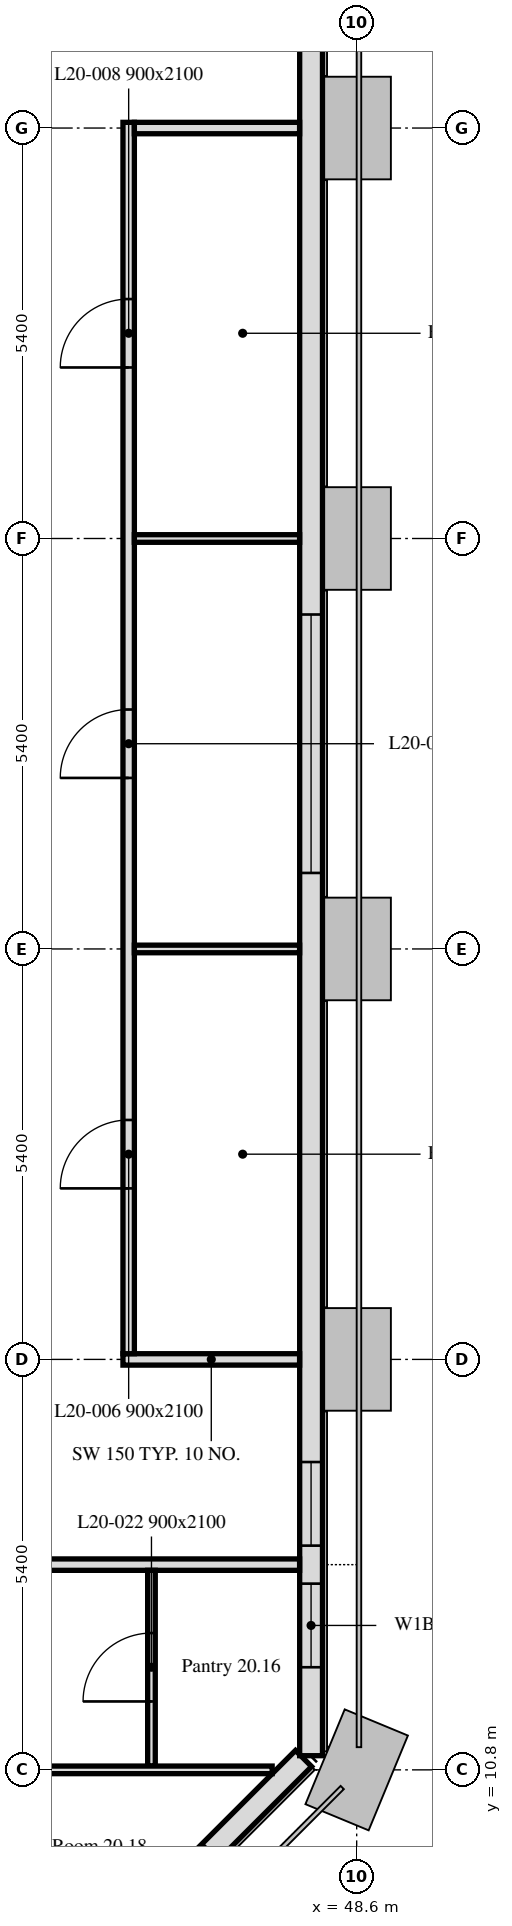
"""IFC4 building model, lengths in metres.
Left out: names, types, materials, properties, quantities, classifications, styles, units other than length and angle.
Written with IfcOpenShell. Run it as: python <this file> out.ifc"""

import sys

from ifc_helpers import new_model, si_unit, direction, frame, frame_2d, origin, place, context, subcontext, project, spatial, rectangle, extrude, element, fill, save


model = new_model("IFC4")
c1 = context("Model", 3, precision=1e-05, world=origin(), true_north=direction((0.0, 1.0)))
c2 = subcontext(c1, "Body", "Model", "MODEL_VIEW")
j1 = project(units=[si_unit("LENGTHUNIT", "METRE"), si_unit("PLANEANGLEUNIT", "RADIAN")], contexts=[c1])
p1 = place(None, origin())
s1 = spatial("IfcSite", under=j1, at=p1, CompositionType="ELEMENT")
p2 = place(p1, origin())
s2 = spatial("IfcBuilding", under=s1, at=p2, CompositionType="ELEMENT")
p3 = place(p2, frame((0.0, 0.0, 87.8)))
s3 = spatial("IfcBuildingStorey", under=s2, at=p3, CompositionType="ELEMENT", Elevation=87.8)
p4 = place(p3, frame((43.051, 6.099, 0.0), z_axis=(0.0, 0.0, 1.0), x_axis=(0.707106781187, 0.707106781187, 0.0)))
e1 = element("IfcWall", 1, at=p4, inside=s3, PredefinedType="SOLIDWALL", context=c2, shape_type="SweptSolid", body=[
    extrude(rectangle(XDim=6.86, YDim=0.3, at=frame_2d((3.43, 0.0))), origin(), (0.0, 0.0, 1.0), 3.5),
])
p5 = place(p4, frame((1.73, 0.0, 0.9)))
e2 = element("IfcOpeningElement", 2, at=p5, cuts=e1, PredefinedType="OPENING", context=c2, shape_type="SweptSolid", body=[
    extrude(rectangle(XDim=3.4, YDim=1.7, at=frame_2d((1.7, 0.85))), frame((0.0, 0.16, 0.0), z_axis=(0.0, -1.0, 0.0), x_axis=(1.0, 0.0, 0.0)), (0.0, 0.0, 1.0), 0.32),
])
p6 = place(p3, frame((48.0, 10.986, 0.0), z_axis=(0.0, 0.0, 1.0), x_axis=(0.0, 1.0, 0.0)))
e3 = element("IfcWall", 3, at=p6, inside=s3, PredefinedType="SOLIDWALL", context=c2, shape_type="SweptSolid", body=[
    extrude(rectangle(XDim=32.027, YDim=0.3, at=frame_2d((16.014, 0.0))), origin(), (0.0, 0.0, 1.0), 3.5),
])
p7 = place(p6, frame((1.164, 0.0, 0.9)))
e4 = element("IfcOpeningElement", 4, at=p7, cuts=e3, PredefinedType="OPENING", context=c2, shape_type="SweptSolid", body=[
    extrude(rectangle(XDim=1.1, YDim=1.7, at=frame_2d((0.55, 0.85))), frame((0.0, 0.16, 0.0), z_axis=(0.0, -1.0, 0.0), x_axis=(1.0, 0.0, 0.0)), (0.0, 0.0, 1.0), 0.32),
])
p8 = place(p6, frame((2.764, 0.0, 0.9)))
e5 = element("IfcOpeningElement", 5, at=p8, cuts=e3, PredefinedType="OPENING", context=c2, shape_type="SweptSolid", body=[
    extrude(rectangle(XDim=1.1, YDim=1.7, at=frame_2d((0.55, 0.85))), frame((0.0, 0.16, 0.0), z_axis=(0.0, -1.0, 0.0), x_axis=(1.0, 0.0, 0.0)), (0.0, 0.0, 1.0), 0.32),
])
p9 = place(p6, frame((11.614, 0.0, 0.9)))
e6 = element("IfcOpeningElement", 6, at=p9, cuts=e3, PredefinedType="OPENING", context=c2, shape_type="SweptSolid", body=[
    extrude(rectangle(XDim=3.4, YDim=1.7, at=frame_2d((1.7, 0.85))), frame((0.0, 0.16, 0.0), z_axis=(0.0, -1.0, 0.0), x_axis=(1.0, 0.0, 0.0)), (0.0, 0.0, 1.0), 0.32),
])
p10 = place(p6, frame((22.764, 0.0, 0.9)))
e7 = element("IfcOpeningElement", 7, at=p10, cuts=e3, PredefinedType="OPENING", context=c2, shape_type="SweptSolid", body=[
    extrude(rectangle(XDim=1.1, YDim=1.7, at=frame_2d((0.55, 0.85))), frame((0.0, 0.16, 0.0), z_axis=(0.0, -1.0, 0.0), x_axis=(1.0, 0.0, 0.0)), (0.0, 0.0, 1.0), 0.32),
])
p11 = place(p6, frame((24.364, 0.0, 0.9)))
e8 = element("IfcOpeningElement", 8, at=p11, cuts=e3, PredefinedType="OPENING", context=c2, shape_type="SweptSolid", body=[
    extrude(rectangle(XDim=1.1, YDim=1.7, at=frame_2d((0.55, 0.85))), frame((0.0, 0.16, 0.0), z_axis=(0.0, -1.0, 0.0), x_axis=(1.0, 0.0, 0.0)), (0.0, 0.0, 1.0), 0.32),
])
p12 = place(p3, frame((47.849, 16.2, 0.0), z_axis=(0.0, 0.0, 1.0), x_axis=(-1.0, 0.0, 0.0)))
e9 = element("IfcWall", 9, at=p12, inside=s3, PredefinedType="PARTITIONING", context=c2, shape_type="SweptSolid", body=[
    extrude(rectangle(XDim=2.324, YDim=0.15, at=frame_2d((1.162, 0.0))), origin(), (0.0, 0.0, 1.0), 2.75),
])
p13 = place(p3, frame((45.6, 16.275, 0.0), z_axis=(0.0, 0.0, 1.0), x_axis=(0.0, 1.0, 0.0)))
e10 = element("IfcWall", 10, at=p13, inside=s3, PredefinedType="PARTITIONING", context=c2, shape_type="SweptSolid", body=[
    extrude(rectangle(XDim=16.2, YDim=0.15, at=frame_2d((8.1, 0.0))), origin(), (0.0, 0.0, 1.0), 2.75),
])
p14 = place(p13, frame((2.175, 0.0, 0.0)))
e11 = element("IfcOpeningElement", 11, at=p14, cuts=e10, PredefinedType="OPENING", context=c2, shape_type="SweptSolid", body=[
    extrude(rectangle(XDim=0.9, YDim=2.1, at=frame_2d((0.45, 1.05))), frame((0.0, 0.075, 0.0), z_axis=(0.0, -1.0, 0.0), x_axis=(1.0, 0.0, 0.0)), (0.0, 0.0, 1.0), 0.15),
])
p15 = place(p13, frame((7.575, 0.0, 0.0)))
e12 = element("IfcOpeningElement", 12, at=p15, cuts=e10, PredefinedType="OPENING", context=c2, shape_type="SweptSolid", body=[
    extrude(rectangle(XDim=0.9, YDim=2.1, at=frame_2d((0.45, 1.05))), frame((0.0, 0.075, 0.0), z_axis=(0.0, -1.0, 0.0), x_axis=(1.0, 0.0, 0.0)), (0.0, 0.0, 1.0), 0.15),
])
p16 = place(p13, frame((12.975, 0.0, 0.0)))
e13 = element("IfcOpeningElement", 13, at=p16, cuts=e10, PredefinedType="OPENING", context=c2, shape_type="SweptSolid", body=[
    extrude(rectangle(XDim=0.9, YDim=2.1, at=frame_2d((0.45, 1.05))), frame((0.0, 0.075, 0.0), z_axis=(0.0, -1.0, 0.0), x_axis=(1.0, 0.0, 0.0)), (0.0, 0.0, 1.0), 0.15),
])
p17 = place(p3, frame((45.675, 32.4, 0.0), z_axis=(0.0, 0.0, 1.0), x_axis=(1.0, 0.0, 0.0)))
e14 = element("IfcWall", 14, at=p17, inside=s3, PredefinedType="PARTITIONING", context=c2, shape_type="SweptSolid", body=[
    extrude(rectangle(XDim=2.174, YDim=0.15, at=frame_2d((1.087, 0.0))), origin(), (0.0, 0.0, 1.0), 2.75),
])
p18 = place(p3, frame((6.151, 13.5, 0.0), z_axis=(0.0, 0.0, 1.0), x_axis=(1.0, 0.0, 0.0)))
e15 = element("IfcWall", 15, at=p18, inside=s3, PredefinedType="PARTITIONING", context=c2, shape_type="SweptSolid", body=[
    extrude(rectangle(XDim=41.698, YDim=0.15, at=frame_2d((20.849, 0.0))), origin(), (0.0, 0.0, 1.0), 3.5),
])
p19 = place(p18, frame((0.879, 0.0, 0.0)))
e16 = element("IfcOpeningElement", 16, at=p19, cuts=e15, PredefinedType="OPENING", context=c2, shape_type="SweptSolid", body=[
    extrude(rectangle(XDim=0.9, YDim=2.1, at=frame_2d((0.45, 1.05))), frame((0.0, 0.075, 0.0), z_axis=(0.0, -1.0, 0.0), x_axis=(1.0, 0.0, 0.0)), (0.0, 0.0, 1.0), 0.15),
])
p20 = place(p18, frame((17.079, 0.0, 0.0)))
e17 = element("IfcOpeningElement", 17, at=p20, cuts=e15, PredefinedType="OPENING", context=c2, shape_type="SweptSolid", body=[
    extrude(rectangle(XDim=0.9, YDim=2.1, at=frame_2d((0.45, 1.05))), frame((0.0, 0.075, 0.0), z_axis=(0.0, -1.0, 0.0), x_axis=(1.0, 0.0, 0.0)), (0.0, 0.0, 1.0), 0.15),
])
p21 = place(p18, frame((33.279, 0.0, 0.0)))
e18 = element("IfcOpeningElement", 18, at=p21, cuts=e15, PredefinedType="OPENING", context=c2, shape_type="SweptSolid", body=[
    extrude(rectangle(XDim=0.9, YDim=2.1, at=frame_2d((0.45, 1.05))), frame((0.0, 0.075, 0.0), z_axis=(0.0, -1.0, 0.0), x_axis=(1.0, 0.0, 0.0)), (0.0, 0.0, 1.0), 0.15),
])
p22 = place(p18, frame((11.679, 0.0, 0.0)))
e19 = element("IfcOpeningElement", 19, at=p22, cuts=e15, PredefinedType="OPENING", context=c2, shape_type="SweptSolid", body=[
    extrude(rectangle(XDim=0.9, YDim=2.1, at=frame_2d((0.45, 1.05))), frame((0.0, 0.075, 0.0), z_axis=(0.0, -1.0, 0.0), x_axis=(1.0, 0.0, 0.0)), (0.0, 0.0, 1.0), 0.15),
])
p23 = place(p18, frame((34.519, 0.0, 0.0)))
e20 = element("IfcOpeningElement", 20, at=p23, cuts=e15, PredefinedType="OPENING", context=c2, shape_type="SweptSolid", body=[
    extrude(rectangle(XDim=0.9, YDim=2.1, at=frame_2d((0.45, 1.05))), frame((0.0, 0.075, 0.0), z_axis=(0.0, -1.0, 0.0), x_axis=(1.0, 0.0, 0.0)), (0.0, 0.0, 1.0), 0.15),
])
p24 = place(p3, frame((45.9, 10.85, 0.0), z_axis=(0.0, 0.0, 1.0), x_axis=(0.0, 1.0, 0.0)))
e21 = element("IfcWall", 21, at=p24, inside=s3, PredefinedType="PARTITIONING", context=c2, shape_type="SweptSolid", body=[
    extrude(rectangle(XDim=2.575, YDim=0.1, at=frame_2d((1.288, 0.0))), origin(), (0.0, 0.0, 1.0), 3.5),
])
p25 = place(p24, frame((0.85, 0.0, 0.0)))
e22 = element("IfcOpeningElement", 22, at=p25, cuts=e21, PredefinedType="OPENING", context=c2, shape_type="SweptSolid", body=[
    extrude(rectangle(XDim=0.9, YDim=2.1, at=frame_2d((0.45, 1.05))), frame((0.0, 0.05, 0.0), z_axis=(0.0, -1.0, 0.0), x_axis=(1.0, 0.0, 0.0)), (0.0, 0.0, 1.0), 0.1),
])
p26 = place(p3, frame((43.72, 10.8, 0.0), z_axis=(0.0, 0.0, 1.0), x_axis=(1.0, 0.0, 0.0)))
e23 = element("IfcWall", 23, at=p26, inside=s3, PredefinedType="PARTITIONING", context=c2, shape_type="SweptSolid", body=[
    extrude(rectangle(XDim=3.768, YDim=0.1, at=frame_2d((1.884, 0.0))), origin(), (0.0, 0.0, 1.0), 3.5),
])
for number, where, z_axis, x_axis in (
    (24, (47.849, 21.6, 0.0), (0.0, 0.0, 1.0), (-1.0, 0.0, 0.0)),
    (25, (47.849, 27.0, 0.0), (0.0, 0.0, 1.0), (-1.0, 0.0, 0.0)),
):
    element("IfcWall", number, at=place(p3, frame(where, z_axis=z_axis, x_axis=x_axis)), inside=s3, PredefinedType="PARTITIONING", context=c2, shape_type="SweptSolid", body=[
        extrude(rectangle(XDim=2.174, YDim=0.1, at=frame_2d((1.087, 0.0))), origin(), (0.0, 0.0, 1.0), 2.75),
    ])
p27 = place(p7, origin())
e26 = element("IfcWindow", 26, at=p27, inside=s3, PartitioningType="SINGLE_PANEL", PredefinedType="WINDOW", context=c2, shape_type="SweptSolid", body=[
    extrude(rectangle(XDim=1.1, YDim=1.7, at=frame_2d((0.55, 0.85))), frame((0.0, 0.03, 0.0), z_axis=(0.0, -1.0, 0.0), x_axis=(1.0, 0.0, 0.0)), (0.0, 0.0, 1.0), 0.06),
])
fill(e4, e26)
p28 = place(p8, origin())
e27 = element("IfcWindow", 27, at=p28, inside=s3, PartitioningType="SINGLE_PANEL", PredefinedType="WINDOW", context=c2, shape_type="SweptSolid", body=[
    extrude(rectangle(XDim=1.1, YDim=1.7, at=frame_2d((0.55, 0.85))), frame((0.0, 0.03, 0.0), z_axis=(0.0, -1.0, 0.0), x_axis=(1.0, 0.0, 0.0)), (0.0, 0.0, 1.0), 0.06),
])
fill(e5, e27)
p29 = place(p9, origin())
e28 = element("IfcWindow", 28, at=p29, inside=s3, PartitioningType="SINGLE_PANEL", PredefinedType="WINDOW", context=c2, shape_type="SweptSolid", body=[
    extrude(rectangle(XDim=3.4, YDim=1.7, at=frame_2d((1.7, 0.85))), frame((0.0, 0.03, 0.0), z_axis=(0.0, -1.0, 0.0), x_axis=(1.0, 0.0, 0.0)), (0.0, 0.0, 1.0), 0.06),
])
fill(e6, e28)
p30 = place(p14, origin())
e29 = element("IfcDoor", 29, at=p30, inside=s3, OperationType="SINGLE_SWING_LEFT", PredefinedType="DOOR", context=c2, shape_type="SweptSolid", body=[
    extrude(rectangle(XDim=0.9, YDim=2.1, at=frame_2d((0.45, 1.05))), frame((0.0, 0.025, 0.0), z_axis=(0.0, -1.0, 0.0), x_axis=(1.0, 0.0, 0.0)), (0.0, 0.0, 1.0), 0.05),
])
fill(e11, e29)
p31 = place(p15, origin())
e30 = element("IfcDoor", 30, at=p31, inside=s3, OperationType="SINGLE_SWING_LEFT", PredefinedType="DOOR", context=c2, shape_type="SweptSolid", body=[
    extrude(rectangle(XDim=0.9, YDim=2.1, at=frame_2d((0.45, 1.05))), frame((0.0, 0.025, 0.0), z_axis=(0.0, -1.0, 0.0), x_axis=(1.0, 0.0, 0.0)), (0.0, 0.0, 1.0), 0.05),
])
fill(e12, e30)
p32 = place(p16, origin())
e31 = element("IfcDoor", 31, at=p32, inside=s3, OperationType="SINGLE_SWING_LEFT", PredefinedType="DOOR", context=c2, shape_type="SweptSolid", body=[
    extrude(rectangle(XDim=0.9, YDim=2.1, at=frame_2d((0.45, 1.05))), frame((0.0, 0.025, 0.0), z_axis=(0.0, -1.0, 0.0), x_axis=(1.0, 0.0, 0.0)), (0.0, 0.0, 1.0), 0.05),
])
fill(e13, e31)
p33 = place(p25, origin())
e32 = element("IfcDoor", 32, at=p33, inside=s3, OperationType="SINGLE_SWING_LEFT", PredefinedType="DOOR", context=c2, shape_type="SweptSolid", body=[
    extrude(rectangle(XDim=0.9, YDim=2.1, at=frame_2d((0.45, 1.05))), frame((0.0, 0.025, 0.0), z_axis=(0.0, -1.0, 0.0), x_axis=(1.0, 0.0, 0.0)), (0.0, 0.0, 1.0), 0.05),
])
fill(e22, e32)
save(model, sys.argv[1])
